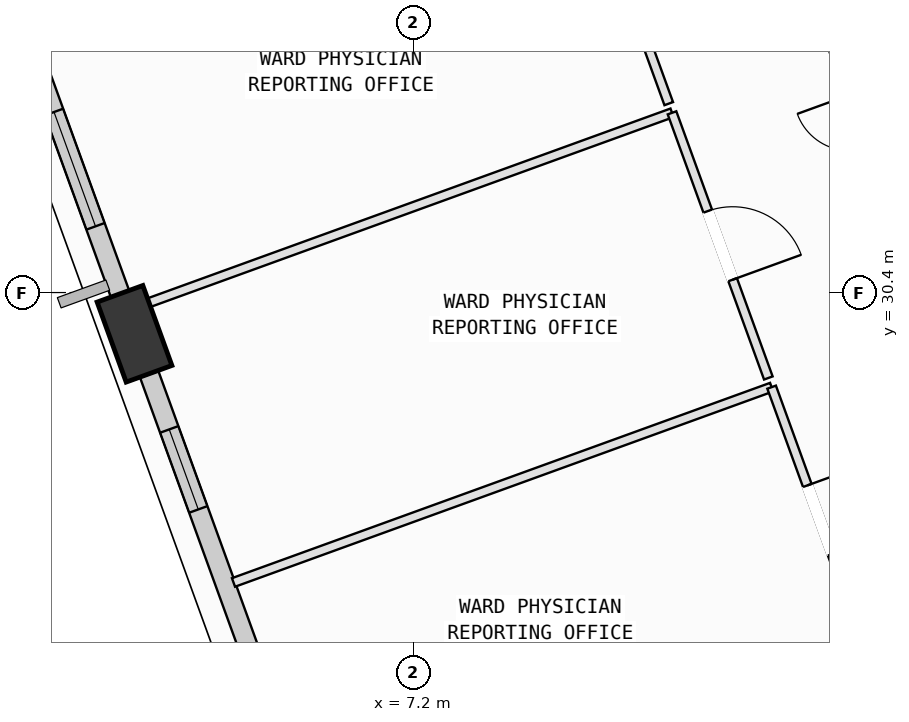
"""IFC4 building model, lengths in metres.
Left out: names, types, materials, properties, quantities, classifications, styles, units other than length and angle.
Written with IfcOpenShell. Run it as: python <this file> out.ifc"""

import sys

from ifc_helpers import new_model, si_unit, direction, frame, frame_2d, origin, origin_2d, place, context, subcontext, project, spatial, rectangle, extrude, element, fill, save


model = new_model("IFC4")
c1 = context("Model", 3, precision=1e-05, world=origin(), true_north=direction((0.0, 1.0)))
c2 = subcontext(c1, "Body", "Model", "MODEL_VIEW")
j1 = project(units=[si_unit("LENGTHUNIT", "METRE"), si_unit("PLANEANGLEUNIT", "RADIAN")], contexts=[c1])
p1 = place(None, origin())
s1 = spatial("IfcSite", under=j1, at=p1, CompositionType="ELEMENT")
p2 = place(p1, origin())
s2 = spatial("IfcBuilding", under=s1, at=p2, CompositionType="ELEMENT")
p3 = place(p2, frame((0.0, 0.0, 108.4)))
s3 = spatial("IfcBuildingStorey", under=s2, at=p3, CompositionType="ELEMENT", Elevation=108.4)
p4 = place(p3, frame((2.611, 29.722, 0.002), z_axis=(-0.019204163449, -0.127522915018, 0.991649689281), x_axis=(-0.198586028496, 0.972557875578, 0.12122197795)))
e1 = element("IfcColumn", 1, at=p4, inside=s3, PredefinedType="COLUMN", context=c2, shape_type="SweptSolid", body=[
    extrude(rectangle(XDim=1.4, YDim=0.8, at=origin_2d()), origin(), (0.0, 0.0, 1.0), 4.03),
])
p5 = place(p3, frame((2.525, 29.959, 0.0), z_axis=(0.0, 0.0, 1.0), x_axis=(-0.341222011067, 0.939982733439, 0.0)))
e2 = element("IfcWall", 2, at=p5, inside=s3, PredefinedType="SOLIDWALL", context=c2, shape_type="SweptSolid", body=[
    extrude(rectangle(XDim=5.456, YDim=0.32, at=frame_2d((2.728, 0.0))), origin(), (0.0, 0.0, 1.0), 3.165),
])
p6 = place(p5, frame((1.628, 0.0, 0.75)))
e3 = element("IfcOpeningElement", 3, at=p6, cuts=e2, PredefinedType="OPENING", context=c2, shape_type="SweptSolid", body=[
    extrude(rectangle(XDim=2.0, YDim=1.95, at=frame_2d((1.0, 0.975))), frame((0.0, 0.17, 0.0), z_axis=(0.0, -1.0, 0.0), x_axis=(1.0, 0.0, 0.0)), (0.0, 0.0, 1.0), 0.34),
])
p7 = place(p3, frame((4.773, 23.765, 0.0), z_axis=(0.0, 0.0, 1.0), x_axis=(-0.341234474443, 0.93997820903, 0.0)))
e4 = element("IfcWall", 4, at=p7, inside=s3, PredefinedType="SOLIDWALL", context=c2, shape_type="SweptSolid", body=[
    extrude(rectangle(XDim=5.628, YDim=0.32, at=frame_2d((2.814, 0.0))), origin(), (0.0, 0.0, 1.0), 3.165),
])
p8 = place(p7, frame((3.263, 0.0, 0.75)))
e5 = element("IfcOpeningElement", 5, at=p8, cuts=e4, PredefinedType="OPENING", context=c2, shape_type="SweptSolid", body=[
    extrude(rectangle(XDim=1.4, YDim=1.85, at=frame_2d((0.7, 0.925))), frame((0.0, 0.17, 0.0), z_axis=(0.0, -1.0, 0.0), x_axis=(1.0, 0.0, 0.0)), (0.0, 0.0, 1.0), 0.34),
])
p9 = place(p3, frame((4.239, 25.632, 0.0), z_axis=(0.0, 0.0, 1.0), x_axis=(0.940008258736, 0.34115168695, 0.0)))
e6 = element("IfcWall", 6, at=p9, inside=s3, PredefinedType="PARTITIONING", context=c2, shape_type="SweptSolid", body=[
    extrude(rectangle(XDim=9.415, YDim=0.15, at=frame_2d((4.708, 0.0))), origin(), (0.0, 0.0, 1.0), 3.78),
])
p10 = place(p3, frame((13.089, 28.844, 0.0), z_axis=(0.0, 0.0, 1.0), x_axis=(0.34120218881, -0.939989928856, 0.0)))
e7 = element("IfcWall", 7, at=p10, inside=s3, PredefinedType="PARTITIONING", context=c2, shape_type="SweptSolid", body=[
    extrude(rectangle(XDim=4.639, YDim=0.15, at=frame_2d((2.32, 0.0))), origin(), (0.0, 0.0, 1.0), 3.78),
])
p11 = place(p10, frame((1.72, 0.0, 0.0)))
e8 = element("IfcOpeningElement", 8, at=p11, cuts=e7, PredefinedType="OPENING", context=c2, shape_type="SweptSolid", body=[
    extrude(rectangle(XDim=1.2, YDim=2.15, at=frame_2d((0.6, 1.075))), frame((0.0, 0.085, 0.0), z_axis=(0.0, -1.0, 0.0), x_axis=(1.0, 0.0, 0.0)), (0.0, 0.0, 1.0), 0.17),
])
p12 = place(p3, frame((2.602, 30.144, 0.0), z_axis=(0.0, 0.0, 1.0), x_axis=(0.939993165995, 0.341193270571, 0.0)))
e9 = element("IfcWall", 9, at=p12, inside=s3, PredefinedType="PARTITIONING", context=c2, shape_type="SweptSolid", body=[
    extrude(rectangle(XDim=9.414, YDim=0.15, at=frame_2d((4.707, 0.0))), origin(), (0.0, 0.0, 1.0), 3.78),
])
p13 = place(p3, frame((11.451, 33.356, 0.0), z_axis=(0.0, 0.0, 1.0), x_axis=(0.341405037491, -0.939916273067, 0.0)))
e10 = element("IfcWall", 10, at=p13, inside=s3, PredefinedType="PARTITIONING", context=c2, shape_type="SweptSolid", body=[
    extrude(rectangle(XDim=4.64, YDim=0.15, at=frame_2d((2.32, 0.0))), origin(), (0.0, 0.0, 1.0), 2.965),
])
p14 = place(p13, frame((1.72, 0.0, 0.0)))
e11 = element("IfcOpeningElement", 11, at=p14, cuts=e10, PredefinedType="OPENING", context=c2, shape_type="SweptSolid", body=[
    extrude(rectangle(XDim=1.2, YDim=2.15, at=frame_2d((0.6, 1.075))), frame((0.0, 0.085, 0.0), z_axis=(0.0, -1.0, 0.0), x_axis=(1.0, 0.0, 0.0)), (0.0, 0.0, 1.0), 0.17),
])
p15 = place(p3, frame((2.637, 28.977, 0.0), z_axis=(0.0, 0.0, 1.0), x_axis=(-0.342253038206, 0.939607821295, 0.0)))
e12 = element("IfcWall", 12, at=p15, inside=s3, PredefinedType="PARTITIONING", context=c2, shape_type="SweptSolid", body=[
    extrude(rectangle(XDim=0.961, YDim=0.15, at=frame_2d((0.48, 0.0))), origin(), (0.0, 0.0, 1.0), 3.165),
])
p16 = place(p3, frame((9.814, 37.868, 0.0), z_axis=(0.0, 0.0, 1.0), x_axis=(0.341219066922, -0.939983802184, 0.0)))
e13 = element("IfcWall", 13, at=p16, inside=s3, PredefinedType="PARTITIONING", context=c2, shape_type="SweptSolid", body=[
    extrude(rectangle(XDim=4.639, YDim=0.15, at=frame_2d((2.32, 0.0))), origin(), (0.0, 0.0, 1.0), 2.965),
])
p17 = place(p16, frame((1.72, 0.0, 0.0)))
e14 = element("IfcOpeningElement", 14, at=p17, cuts=e13, PredefinedType="OPENING", context=c2, shape_type="SweptSolid", body=[
    extrude(rectangle(XDim=1.2, YDim=2.15, at=frame_2d((0.6, 1.075))), frame((0.0, 0.085, 0.0), z_axis=(0.0, -1.0, 0.0), x_axis=(1.0, 0.0, 0.0)), (0.0, 0.0, 1.0), 0.17),
])
p18 = place(p3, frame((15.795, 29.742, 0.0), z_axis=(0.0, 0.0, 1.0), x_axis=(-0.341080711776, 0.940034014307, 0.0)))
e15 = element("IfcWall", 15, at=p18, inside=s3, PredefinedType="PARTITIONING", context=c2, shape_type="SweptSolid", body=[
    extrude(rectangle(XDim=7.4, YDim=0.15, at=frame_2d((3.7, 0.0))), origin(), (0.0, 0.0, 1.0), 3.78),
])
p19 = place(p18, frame((3.24, 0.0, 0.0)))
e16 = element("IfcOpeningElement", 16, at=p19, cuts=e15, PredefinedType="OPENING", context=c2, shape_type="SweptSolid", body=[
    extrude(rectangle(XDim=0.92, YDim=2.1, at=frame_2d((0.46, 1.05))), frame((0.0, 0.085, 0.0), z_axis=(0.0, -1.0, 0.0), x_axis=(1.0, 0.0, 0.0)), (0.0, 0.0, 1.0), 0.17),
])
p20 = place(p6, origin())
e17 = element("IfcWindow", 17, at=p20, inside=s3, PartitioningType="SINGLE_PANEL", PredefinedType="WINDOW", context=c2, shape_type="SweptSolid", body=[
    extrude(rectangle(XDim=2.0, YDim=1.95, at=frame_2d((1.0, 0.975))), frame((0.0, 0.03, 0.0), z_axis=(0.0, -1.0, 0.0), x_axis=(1.0, 0.0, 0.0)), (0.0, 0.0, 1.0), 0.06),
])
fill(e3, e17)
p21 = place(p8, origin())
e18 = element("IfcWindow", 18, at=p21, inside=s3, PartitioningType="SINGLE_PANEL", PredefinedType="WINDOW", context=c2, shape_type="SweptSolid", body=[
    extrude(rectangle(XDim=1.4, YDim=1.85, at=frame_2d((0.7, 0.925))), frame((0.0, 0.03, 0.0), z_axis=(0.0, -1.0, 0.0), x_axis=(1.0, 0.0, 0.0)), (0.0, 0.0, 1.0), 0.06),
])
fill(e5, e18)
p22 = place(p11, origin())
e19 = element("IfcDoor", 19, at=p22, inside=s3, OperationType="SINGLE_SWING_LEFT", PredefinedType="DOOR", context=c2, shape_type="SweptSolid", body=[
    extrude(rectangle(XDim=1.2, YDim=2.15, at=frame_2d((0.6, 1.075))), frame((0.0, 0.025, 0.0), z_axis=(0.0, -1.0, 0.0), x_axis=(1.0, 0.0, 0.0)), (0.0, 0.0, 1.0), 0.05),
])
fill(e8, e19)
p23 = place(p14, origin())
e20 = element("IfcDoor", 20, at=p23, inside=s3, OperationType="SINGLE_SWING_RIGHT", PredefinedType="DOOR", context=c2, shape_type="SweptSolid", body=[
    extrude(rectangle(XDim=1.2, YDim=2.15, at=frame_2d((0.6, 1.075))), frame((0.0, 0.025, 0.0), z_axis=(0.0, -1.0, 0.0), x_axis=(1.0, 0.0, 0.0)), (0.0, 0.0, 1.0), 0.05),
])
fill(e11, e20)
save(model, sys.argv[1])
